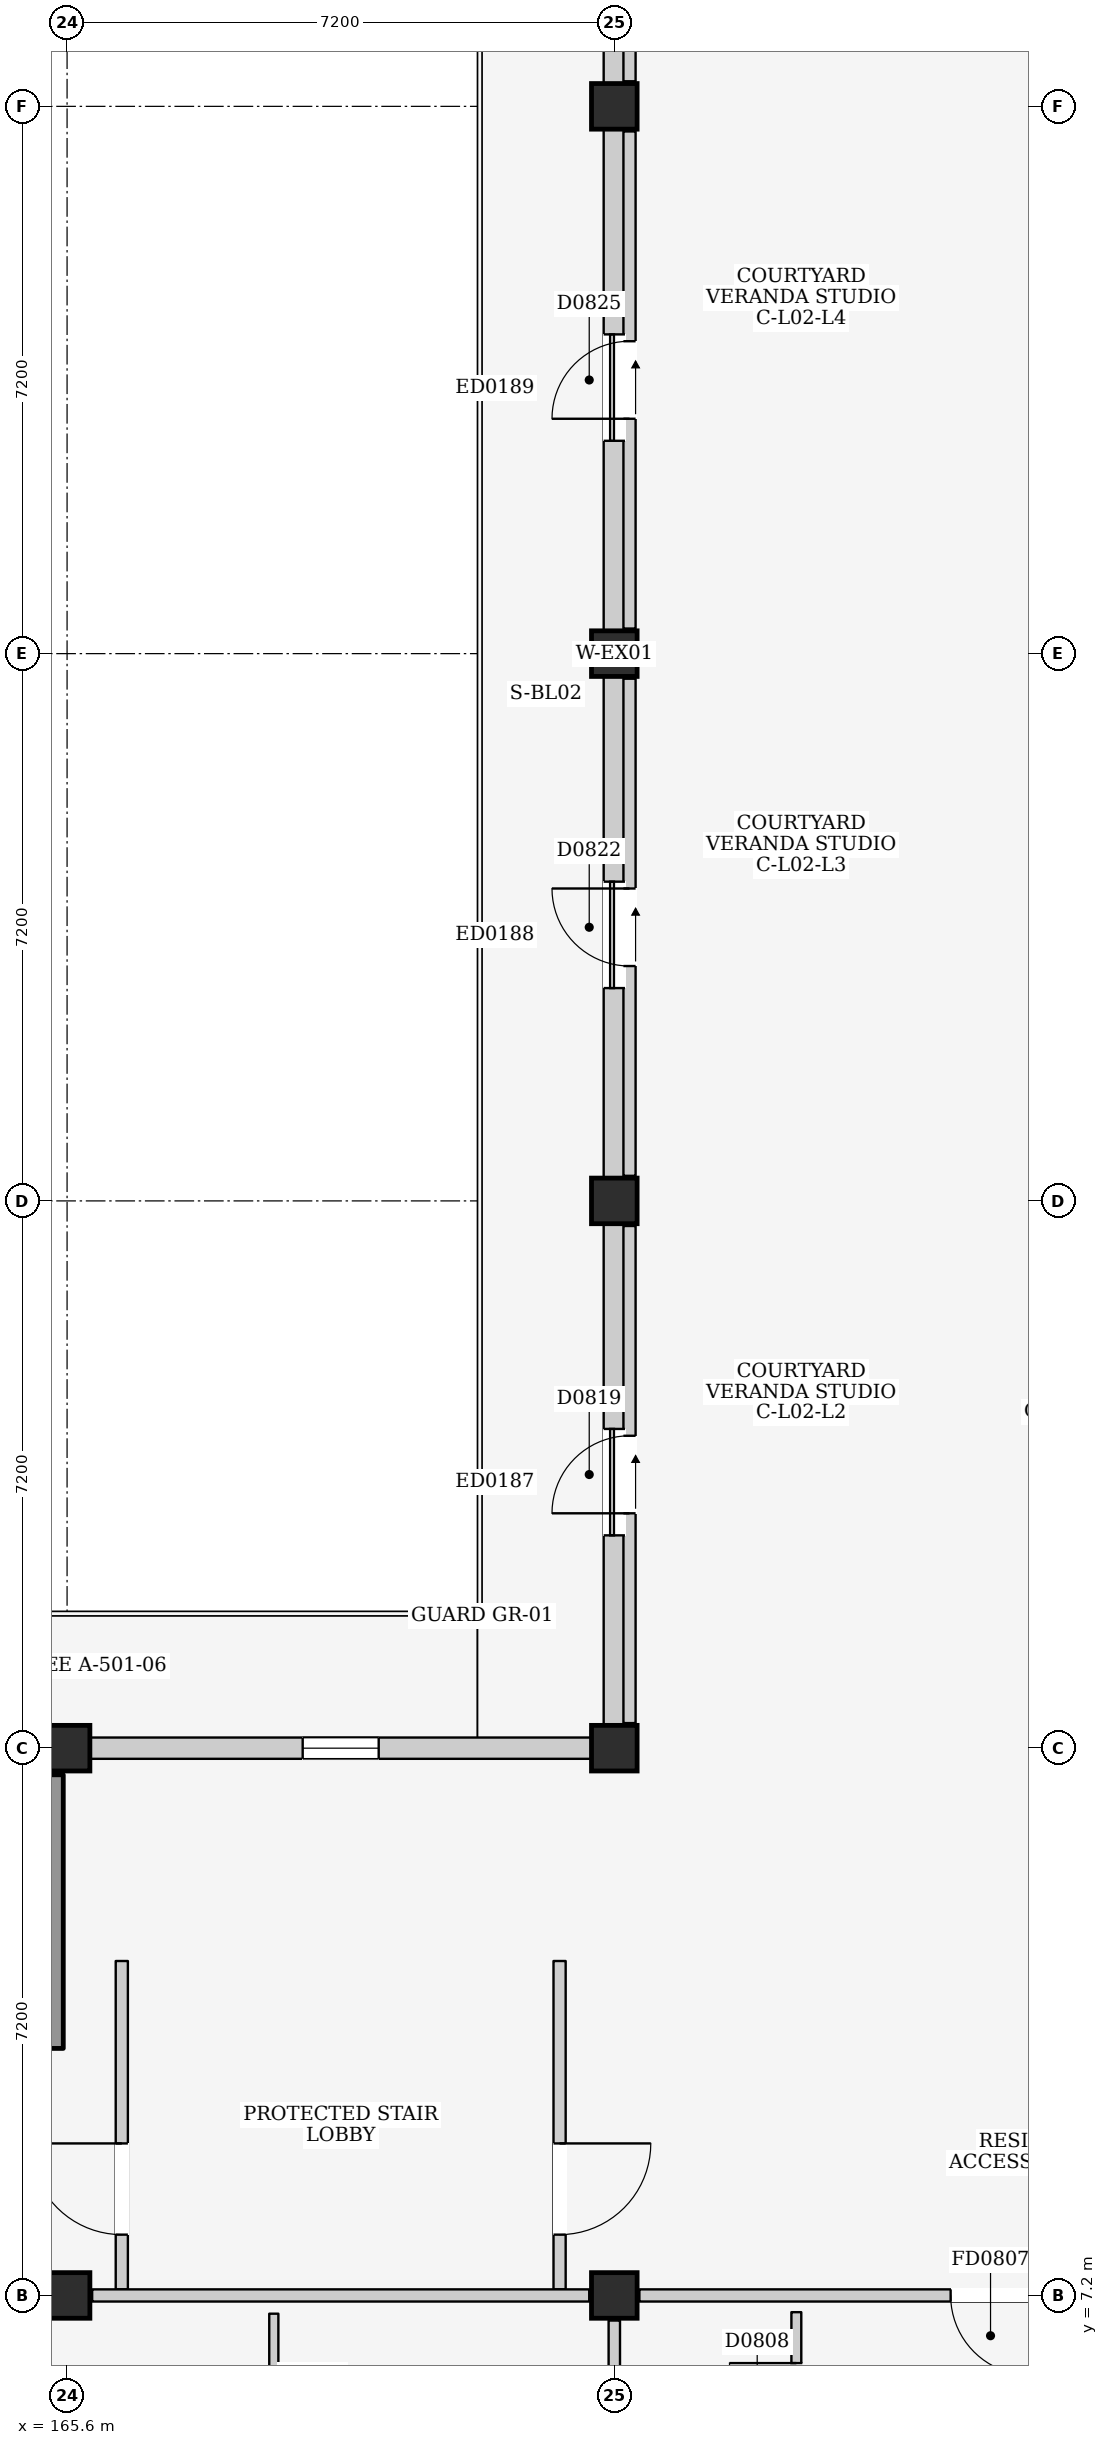
"""IFC4 building model, lengths in metres.
Left out: names, types, materials, properties, quantities, classifications, styles, units other than length and angle.
Written with IfcOpenShell. Run it as: python <this file> out.ifc"""

import sys

from ifc_helpers import new_model, si_unit, direction, frame, frame_2d, origin, origin_2d, place, context, subcontext, project, spatial, rectangle, extrude, element, fill, save


model = new_model("IFC4")
c1 = context("Model", 3, precision=1e-05, world=origin(), true_north=direction((0.0, 1.0)))
c2 = subcontext(c1, "Body", "Model", "MODEL_VIEW")
j1 = project(units=[si_unit("LENGTHUNIT", "METRE"), si_unit("PLANEANGLEUNIT", "RADIAN")], contexts=[c1])
p1 = place(None, origin())
s1 = spatial("IfcSite", under=j1, at=p1, CompositionType="ELEMENT")
p2 = place(p1, origin())
s2 = spatial("IfcBuilding", under=s1, at=p2, CompositionType="ELEMENT")
p3 = place(p2, frame((0.0, 0.0, 9.0)))
s3 = spatial("IfcBuildingStorey", under=s2, at=p3, CompositionType="ELEMENT", Elevation=9.0)
for number, where, z_axis, x_axis in (
    (1, (165.6, 7.2, 0.0), (0.0, 0.0, 1.0), (1.0, 0.0, 0.0)),
    (2, (165.6, 14.4, 0.0), (0.0, 0.0, 1.0), (1.0, 0.0, 0.0)),
    (3, (172.8, 7.2, 0.0), (0.0, 0.0, 1.0), (1.0, 0.0, 0.0)),
    (4, (172.8, 14.4, 0.0), (0.0, 0.0, 1.0), (1.0, 0.0, 0.0)),
    (5, (172.8, 21.6, 0.0), (0.0, 0.0, 1.0), (1.0, 0.0, 0.0)),
    (6, (172.8, 28.8, 0.0), (0.0, 0.0, 1.0), (1.0, 0.0, 0.0)),
    (7, (172.8, 36.0, 0.0), (0.0, 0.0, 1.0), (1.0, 0.0, 0.0)),
):
    element("IfcColumn", number, at=place(p3, frame(where, z_axis=z_axis, x_axis=x_axis)), inside=s3, PredefinedType="COLUMN", context=c2, shape_type="SweptSolid", body=[
        extrude(rectangle(XDim=0.6, YDim=0.6, at=origin_2d()), origin(), (0.0, 0.0, 1.0), 3.2),
    ])
p4 = place(p3, frame((165.9, 14.4, 0.0), z_axis=(0.0, 0.0, 1.0), x_axis=(1.0, 0.0, 0.0)))
e8 = element("IfcWall", 8, at=p4, inside=s3, PredefinedType="ELEMENTEDWALL", context=c2, shape_type="SweptSolid", body=[
    extrude(rectangle(XDim=6.6, YDim=0.28, at=frame_2d((3.3, 0.0))), origin(), (0.0, 0.0, 1.0), 2.345),
])
p5 = place(p4, frame((2.8, 0.0, 1.2)))
e9 = element("IfcOpeningElement", 9, at=p5, cuts=e8, PredefinedType="OPENING", context=c2, shape_type="SweptSolid", body=[
    extrude(rectangle(XDim=1.0, YDim=0.9, at=frame_2d((0.5, 0.45))), frame((0.0, 0.155, 0.0), z_axis=(0.0, -1.0, 0.0), x_axis=(1.0, 0.0, 0.0)), (0.0, 0.0, 1.0), 0.31),
])
p6 = place(p3, frame((172.8, 14.7, 0.0), z_axis=(0.0, 0.0, 1.0), x_axis=(0.0, 1.0, 0.0)))
e10 = element("IfcWall", 10, at=p6, inside=s3, PredefinedType="ELEMENTEDWALL", context=c2, shape_type="SweptSolid", body=[
    extrude(rectangle(XDim=6.6, YDim=0.28, at=frame_2d((3.3, 0.0))), origin(), (0.0, 0.0, 1.0), 2.395),
])
p7 = place(p6, frame((2.5, 0.0, 0.0)))
e11 = element("IfcOpeningElement", 11, at=p7, cuts=e10, PredefinedType="OPENING", context=c2, shape_type="SweptSolid", body=[
    extrude(rectangle(XDim=1.4, YDim=2.1, at=frame_2d((0.7, 1.05))), frame((0.0, 0.155, 0.0), z_axis=(0.0, -1.0, 0.0), x_axis=(1.0, 0.0, 0.0)), (0.0, 0.0, 1.0), 0.31),
])
p8 = place(p3, frame((172.8, 21.9, 0.0), z_axis=(0.0, 0.0, 1.0), x_axis=(0.0, 1.0, 0.0)))
e12 = element("IfcWall", 12, at=p8, inside=s3, PredefinedType="ELEMENTEDWALL", context=c2, shape_type="SweptSolid", body=[
    extrude(rectangle(XDim=6.6, YDim=0.28, at=frame_2d((3.3, 0.0))), origin(), (0.0, 0.0, 1.0), 2.395),
])
p9 = place(p8, frame((2.5, 0.0, 0.0)))
e13 = element("IfcOpeningElement", 13, at=p9, cuts=e12, PredefinedType="OPENING", context=c2, shape_type="SweptSolid", body=[
    extrude(rectangle(XDim=1.4, YDim=2.1, at=frame_2d((0.7, 1.05))), frame((0.0, 0.155, 0.0), z_axis=(0.0, -1.0, 0.0), x_axis=(1.0, 0.0, 0.0)), (0.0, 0.0, 1.0), 0.31),
])
p10 = place(p3, frame((172.8, 29.1, 0.0), z_axis=(0.0, 0.0, 1.0), x_axis=(0.0, 1.0, 0.0)))
e14 = element("IfcWall", 14, at=p10, inside=s3, PredefinedType="ELEMENTEDWALL", context=c2, shape_type="SweptSolid", body=[
    extrude(rectangle(XDim=6.6, YDim=0.28, at=frame_2d((3.3, 0.0))), origin(), (0.0, 0.0, 1.0), 2.395),
])
p11 = place(p10, frame((2.5, 0.0, 0.0)))
e15 = element("IfcOpeningElement", 15, at=p11, cuts=e14, PredefinedType="OPENING", context=c2, shape_type="SweptSolid", body=[
    extrude(rectangle(XDim=1.4, YDim=2.1, at=frame_2d((0.7, 1.05))), frame((0.0, 0.155, 0.0), z_axis=(0.0, -1.0, 0.0), x_axis=(1.0, 0.0, 0.0)), (0.0, 0.0, 1.0), 0.31),
])
p12 = place(p3, frame((172.8, 36.3, 0.0), z_axis=(0.0, 0.0, 1.0), x_axis=(0.0, 1.0, 0.0)))
e16 = element("IfcWall", 16, at=p12, inside=s3, PredefinedType="ELEMENTEDWALL", context=c2, shape_type="SweptSolid", body=[
    extrude(rectangle(XDim=6.6, YDim=0.28, at=frame_2d((3.3, 0.0))), origin(), (0.0, 0.0, 1.0), 2.395),
])
p13 = place(p12, frame((2.5, 0.0, 0.0)))
e17 = element("IfcOpeningElement", 17, at=p13, cuts=e16, PredefinedType="OPENING", context=c2, shape_type="SweptSolid", body=[
    extrude(rectangle(XDim=1.4, YDim=2.1, at=frame_2d((0.7, 1.05))), frame((0.0, 0.155, 0.0), z_axis=(0.0, -1.0, 0.0), x_axis=(1.0, 0.0, 0.0)), (0.0, 0.0, 1.0), 0.31),
])
p14 = place(p3, frame((165.4, 10.45, 0.0), z_axis=(0.0, 0.0, 1.0), x_axis=(0.0, 1.0, 0.0)))
e18 = element("IfcWall", 18, at=p14, inside=s3, PredefinedType="SHEAR", context=c2, shape_type="SweptSolid", body=[
    extrude(rectangle(XDim=3.6, YDim=0.3, at=frame_2d((1.8, 0.0))), origin(), (0.0, 0.0, 1.0), 2.96),
])
p15 = place(p3, frame((166.32, 7.28, 0.0), z_axis=(0.0, 0.0, 1.0), x_axis=(0.0, 1.0, 0.0)))
e19 = element("IfcWall", 19, at=p15, inside=s3, PredefinedType="PARTITIONING", context=c2, shape_type="SweptSolid", body=[
    extrude(rectangle(XDim=4.32, YDim=0.16, at=frame_2d((2.16, 0.0))), origin(), (0.0, 0.0, 1.0), 2.96),
])
p16 = place(p15, frame((0.72, 0.0, 0.0)))
e20 = element("IfcOpeningElement", 20, at=p16, cuts=e19, PredefinedType="OPENING", context=c2, shape_type="SweptSolid", body=[
    extrude(rectangle(XDim=1.2, YDim=2.2, at=frame_2d((0.6, 1.1))), frame((0.0, 0.095, 0.0), z_axis=(0.0, -1.0, 0.0), x_axis=(1.0, 0.0, 0.0)), (0.0, 0.0, 1.0), 0.19),
])
p17 = place(p3, frame((172.08, 7.28, 0.0), z_axis=(0.0, 0.0, 1.0), x_axis=(0.0, 1.0, 0.0)))
e21 = element("IfcWall", 21, at=p17, inside=s3, PredefinedType="PARTITIONING", context=c2, shape_type="SweptSolid", body=[
    extrude(rectangle(XDim=4.32, YDim=0.16, at=frame_2d((2.16, 0.0))), origin(), (0.0, 0.0, 1.0), 2.96),
])
p18 = place(p17, frame((0.72, 0.0, 0.0)))
e22 = element("IfcOpeningElement", 22, at=p18, cuts=e21, PredefinedType="OPENING", context=c2, shape_type="SweptSolid", body=[
    extrude(rectangle(XDim=1.2, YDim=2.2, at=frame_2d((0.6, 1.1))), frame((0.0, 0.095, 0.0), z_axis=(0.0, -1.0, 0.0), x_axis=(1.0, 0.0, 0.0)), (0.0, 0.0, 1.0), 0.19),
])
p19 = place(p3, frame((165.93, 7.2, 0.0), z_axis=(0.0, 0.0, 1.0), x_axis=(1.0, 0.0, 0.0)))
e23 = element("IfcWall", 23, at=p19, inside=s3, PredefinedType="PARTITIONING", context=c2, shape_type="SweptSolid", body=[
    extrude(rectangle(XDim=6.54, YDim=0.16, at=frame_2d((3.27, 0.0))), origin(), (0.0, 0.0, 1.0), 2.345),
])
p20 = place(p3, frame((172.8, 0.33, 0.0), z_axis=(0.0, 0.0, 1.0), x_axis=(0.0, 1.0, 0.0)))
e24 = element("IfcWall", 24, at=p20, inside=s3, PredefinedType="PARTITIONING", context=c2, shape_type="SweptSolid", body=[
    extrude(rectangle(XDim=6.54, YDim=0.15, at=frame_2d((3.27, 0.0))), origin(), (0.0, 0.0, 1.0), 2.395),
])
p21 = place(p3, frame((168.32, 3.92, 0.0), z_axis=(0.0, 0.0, 1.0), x_axis=(0.0, 1.0, 0.0)))
e25 = element("IfcWall", 25, at=p21, inside=s3, PredefinedType="PARTITIONING", context=c2, shape_type="SweptSolid", body=[
    extrude(rectangle(XDim=3.04, YDim=0.12, at=frame_2d((1.52, 0.0))), origin(), (0.0, 0.0, 1.0), 2.96),
])
p22 = place(p21, frame((1.04, 0.0, 0.0)))
e26 = element("IfcOpeningElement", 26, at=p22, cuts=e25, PredefinedType="OPENING", context=c2, shape_type="SweptSolid", body=[
    extrude(rectangle(XDim=0.96, YDim=2.15, at=frame_2d((0.48, 1.075))), frame((0.0, 0.075, 0.0), z_axis=(0.0, -1.0, 0.0), x_axis=(1.0, 0.0, 0.0)), (0.0, 0.0, 1.0), 0.15),
])
p23 = place(p3, frame((173.13, 7.2, 0.0), z_axis=(0.0, 0.0, 1.0), x_axis=(1.0, 0.0, 0.0)))
e27 = element("IfcWall", 27, at=p23, inside=s3, PredefinedType="PARTITIONING", context=c2, shape_type="SweptSolid", body=[
    extrude(rectangle(XDim=6.54, YDim=0.16, at=frame_2d((3.27, 0.0))), origin(), (0.0, 0.0, 1.0), 2.345),
])
p24 = place(p23, frame((4.095, 0.0, 0.0)))
e28 = element("IfcOpeningElement", 28, at=p24, cuts=e27, PredefinedType="OPENING", context=c2, shape_type="SweptSolid", body=[
    extrude(rectangle(XDim=1.05, YDim=2.15, at=frame_2d((0.525, 1.075))), frame((0.0, 0.095, 0.0), z_axis=(0.0, -1.0, 0.0), x_axis=(1.0, 0.0, 0.0)), (0.0, 0.0, 1.0), 0.19),
])
p25 = place(p3, frame((175.195, 4.76, 0.0), z_axis=(0.0, 0.0, 1.0), x_axis=(0.0, 1.0, 0.0)))
e29 = element("IfcWall", 29, at=p25, inside=s3, PredefinedType="PARTITIONING", context=c2, shape_type="SweptSolid", body=[
    extrude(rectangle(XDim=2.22, YDim=0.13, at=frame_2d((1.11, 0.0))), origin(), (0.0, 0.0, 1.0), 2.96),
])
p26 = place(p25, frame((0.67, 0.0, 0.0)))
e30 = element("IfcOpeningElement", 30, at=p26, cuts=e29, PredefinedType="OPENING", context=c2, shape_type="SweptSolid", body=[
    extrude(rectangle(XDim=0.88, YDim=2.1, at=frame_2d((0.44, 1.05))), frame((0.0, 0.08, 0.0), z_axis=(0.0, -1.0, 0.0), x_axis=(1.0, 0.0, 0.0)), (0.0, 0.0, 1.0), 0.16),
])
p27 = place(p3, frame((173.0, 14.73, 0.0), z_axis=(0.0, 0.0, 1.0), x_axis=(0.0, 1.0, 0.0)))
e31 = element("IfcWall", 31, at=p27, inside=s3, PredefinedType="PARTITIONING", context=c2, shape_type="SweptSolid", body=[
    extrude(rectangle(XDim=6.54, YDim=0.16, at=frame_2d((3.27, 0.0))), origin(), (0.0, 0.0, 1.0), 2.395),
])
p28 = place(p27, frame((2.76, 0.0, 0.0)))
e32 = element("IfcOpeningElement", 32, at=p28, cuts=e31, PredefinedType="OPENING", context=c2, shape_type="SweptSolid", body=[
    extrude(rectangle(XDim=1.02, YDim=2.18, at=frame_2d((0.51, 1.09))), frame((0.0, 0.095, 0.0), z_axis=(0.0, -1.0, 0.0), x_axis=(1.0, 0.0, 0.0)), (0.0, 0.0, 1.0), 0.19),
])
p29 = place(p3, frame((173.0, 21.93, 0.0), z_axis=(0.0, 0.0, 1.0), x_axis=(0.0, 1.0, 0.0)))
e33 = element("IfcWall", 33, at=p29, inside=s3, PredefinedType="PARTITIONING", context=c2, shape_type="SweptSolid", body=[
    extrude(rectangle(XDim=6.54, YDim=0.16, at=frame_2d((3.27, 0.0))), origin(), (0.0, 0.0, 1.0), 2.395),
])
p30 = place(p29, frame((2.76, 0.0, 0.0)))
e34 = element("IfcOpeningElement", 34, at=p30, cuts=e33, PredefinedType="OPENING", context=c2, shape_type="SweptSolid", body=[
    extrude(rectangle(XDim=1.02, YDim=2.18, at=frame_2d((0.51, 1.09))), frame((0.0, 0.095, 0.0), z_axis=(0.0, -1.0, 0.0), x_axis=(1.0, 0.0, 0.0)), (0.0, 0.0, 1.0), 0.19),
])
p31 = place(p3, frame((173.0, 29.13, 0.0), z_axis=(0.0, 0.0, 1.0), x_axis=(0.0, 1.0, 0.0)))
e35 = element("IfcWall", 35, at=p31, inside=s3, PredefinedType="PARTITIONING", context=c2, shape_type="SweptSolid", body=[
    extrude(rectangle(XDim=6.54, YDim=0.16, at=frame_2d((3.27, 0.0))), origin(), (0.0, 0.0, 1.0), 2.395),
])
p32 = place(p31, frame((2.76, 0.0, 0.0)))
e36 = element("IfcOpeningElement", 36, at=p32, cuts=e35, PredefinedType="OPENING", context=c2, shape_type="SweptSolid", body=[
    extrude(rectangle(XDim=1.02, YDim=2.18, at=frame_2d((0.51, 1.09))), frame((0.0, 0.095, 0.0), z_axis=(0.0, -1.0, 0.0), x_axis=(1.0, 0.0, 0.0)), (0.0, 0.0, 1.0), 0.19),
])
p33 = place(p3, frame((173.0, 36.33, 0.0), z_axis=(0.0, 0.0, 1.0), x_axis=(0.0, 1.0, 0.0)))
e37 = element("IfcWall", 37, at=p33, inside=s3, PredefinedType="PARTITIONING", context=c2, shape_type="SweptSolid", body=[
    extrude(rectangle(XDim=6.54, YDim=0.16, at=frame_2d((3.27, 0.0))), origin(), (0.0, 0.0, 1.0), 2.395),
])
p34 = place(p33, frame((2.76, 0.0, 0.0)))
e38 = element("IfcOpeningElement", 38, at=p34, cuts=e37, PredefinedType="OPENING", context=c2, shape_type="SweptSolid", body=[
    extrude(rectangle(XDim=1.02, YDim=2.18, at=frame_2d((0.51, 1.09))), frame((0.0, 0.095, 0.0), z_axis=(0.0, -1.0, 0.0), x_axis=(1.0, 0.0, 0.0)), (0.0, 0.0, 1.0), 0.19),
])
p35 = place(p5, origin())
e39 = element("IfcWindow", 39, at=p35, inside=s3, PartitioningType="SINGLE_PANEL", PredefinedType="WINDOW", context=c2, shape_type="SweptSolid", body=[
    extrude(rectangle(XDim=1.0, YDim=0.9, at=frame_2d((0.5, 0.45))), frame((0.0, 0.03, 0.0), z_axis=(0.0, -1.0, 0.0), x_axis=(1.0, 0.0, 0.0)), (0.0, 0.0, 1.0), 0.06),
])
fill(e9, e39)
p36 = place(p7, frame((1.4, 0.0, 0.0), z_axis=(0.0, 0.0, 1.0), x_axis=(-1.0, 0.0, 0.0)))
e40 = element("IfcDoor", 40, at=p36, inside=s3, OperationType="SLIDING_TO_RIGHT", PredefinedType="DOOR", context=c2, shape_type="SweptSolid", body=[
    extrude(rectangle(XDim=1.4, YDim=2.1, at=frame_2d((0.7, 1.05))), frame((0.0, 0.025, 0.0), z_axis=(0.0, -1.0, 0.0), x_axis=(1.0, 0.0, 0.0)), (0.0, 0.0, 1.0), 0.05),
])
fill(e11, e40)
p37 = place(p9, frame((1.4, 0.0, 0.0), z_axis=(0.0, 0.0, 1.0), x_axis=(-1.0, 0.0, 0.0)))
e41 = element("IfcDoor", 41, at=p37, inside=s3, OperationType="SLIDING_TO_RIGHT", PredefinedType="DOOR", context=c2, shape_type="SweptSolid", body=[
    extrude(rectangle(XDim=1.4, YDim=2.1, at=frame_2d((0.7, 1.05))), frame((0.0, 0.025, 0.0), z_axis=(0.0, -1.0, 0.0), x_axis=(1.0, 0.0, 0.0)), (0.0, 0.0, 1.0), 0.05),
])
fill(e13, e41)
p38 = place(p11, frame((1.4, 0.0, 0.0), z_axis=(0.0, 0.0, 1.0), x_axis=(-1.0, 0.0, 0.0)))
e42 = element("IfcDoor", 42, at=p38, inside=s3, OperationType="SLIDING_TO_RIGHT", PredefinedType="DOOR", context=c2, shape_type="SweptSolid", body=[
    extrude(rectangle(XDim=1.4, YDim=2.1, at=frame_2d((0.7, 1.05))), frame((0.0, 0.025, 0.0), z_axis=(0.0, -1.0, 0.0), x_axis=(1.0, 0.0, 0.0)), (0.0, 0.0, 1.0), 0.05),
])
fill(e15, e42)
p39 = place(p16, origin())
e43 = element("IfcDoor", 43, at=p39, inside=s3, OperationType="SINGLE_SWING_RIGHT", PredefinedType="DOOR", context=c2, shape_type="SweptSolid", body=[
    extrude(rectangle(XDim=1.2, YDim=2.2, at=frame_2d((0.6, 1.1))), frame((0.0, 0.025, 0.0), z_axis=(0.0, -1.0, 0.0), x_axis=(1.0, 0.0, 0.0)), (0.0, 0.0, 1.0), 0.05),
])
fill(e20, e43)
p40 = place(p18, frame((1.2, 0.0, 0.0), z_axis=(0.0, 0.0, 1.0), x_axis=(-1.0, 0.0, 0.0)))
e44 = element("IfcDoor", 44, at=p40, inside=s3, OperationType="SINGLE_SWING_LEFT", PredefinedType="DOOR", context=c2, shape_type="SweptSolid", body=[
    extrude(rectangle(XDim=1.2, YDim=2.2, at=frame_2d((0.6, 1.1))), frame((0.0, 0.025, 0.0), z_axis=(0.0, -1.0, 0.0), x_axis=(1.0, 0.0, 0.0)), (0.0, 0.0, 1.0), 0.05),
])
fill(e22, e44)
p41 = place(p24, frame((1.05, 0.0, 0.0), z_axis=(0.0, 0.0, 1.0), x_axis=(-1.0, 0.0, 0.0)))
e45 = element("IfcDoor", 45, at=p41, inside=s3, OperationType="SINGLE_SWING_LEFT", PredefinedType="DOOR", context=c2, shape_type="SweptSolid", body=[
    extrude(rectangle(XDim=1.05, YDim=2.15, at=frame_2d((0.525, 1.075))), frame((0.0, 0.025, 0.0), z_axis=(0.0, -1.0, 0.0), x_axis=(1.0, 0.0, 0.0)), (0.0, 0.0, 1.0), 0.05),
])
fill(e28, e45)
p42 = place(p26, origin())
e46 = element("IfcDoor", 46, at=p42, inside=s3, OperationType="SINGLE_SWING_RIGHT", PredefinedType="DOOR", context=c2, shape_type="SweptSolid", body=[
    extrude(rectangle(XDim=0.88, YDim=2.1, at=frame_2d((0.44, 1.05))), frame((0.0, 0.025, 0.0), z_axis=(0.0, -1.0, 0.0), x_axis=(1.0, 0.0, 0.0)), (0.0, 0.0, 1.0), 0.05),
])
fill(e30, e46)
p43 = place(p28, origin())
e47 = element("IfcDoor", 47, at=p43, inside=s3, OperationType="SINGLE_SWING_LEFT", PredefinedType="DOOR", context=c2, shape_type="SweptSolid", body=[
    extrude(rectangle(XDim=1.02, YDim=2.18, at=frame_2d((0.51, 1.09))), frame((0.0, 0.025, 0.0), z_axis=(0.0, -1.0, 0.0), x_axis=(1.0, 0.0, 0.0)), (0.0, 0.0, 1.0), 0.05),
])
fill(e32, e47)
p44 = place(p30, origin())
e48 = element("IfcDoor", 48, at=p44, inside=s3, OperationType="SINGLE_SWING_RIGHT", PredefinedType="DOOR", context=c2, shape_type="SweptSolid", body=[
    extrude(rectangle(XDim=1.02, YDim=2.18, at=frame_2d((0.51, 1.09))), frame((0.0, 0.025, 0.0), z_axis=(0.0, -1.0, 0.0), x_axis=(1.0, 0.0, 0.0)), (0.0, 0.0, 1.0), 0.05),
])
fill(e34, e48)
p45 = place(p32, origin())
e49 = element("IfcDoor", 49, at=p45, inside=s3, OperationType="SINGLE_SWING_LEFT", PredefinedType="DOOR", context=c2, shape_type="SweptSolid", body=[
    extrude(rectangle(XDim=1.02, YDim=2.18, at=frame_2d((0.51, 1.09))), frame((0.0, 0.025, 0.0), z_axis=(0.0, -1.0, 0.0), x_axis=(1.0, 0.0, 0.0)), (0.0, 0.0, 1.0), 0.05),
])
fill(e36, e49)
save(model, sys.argv[1])
